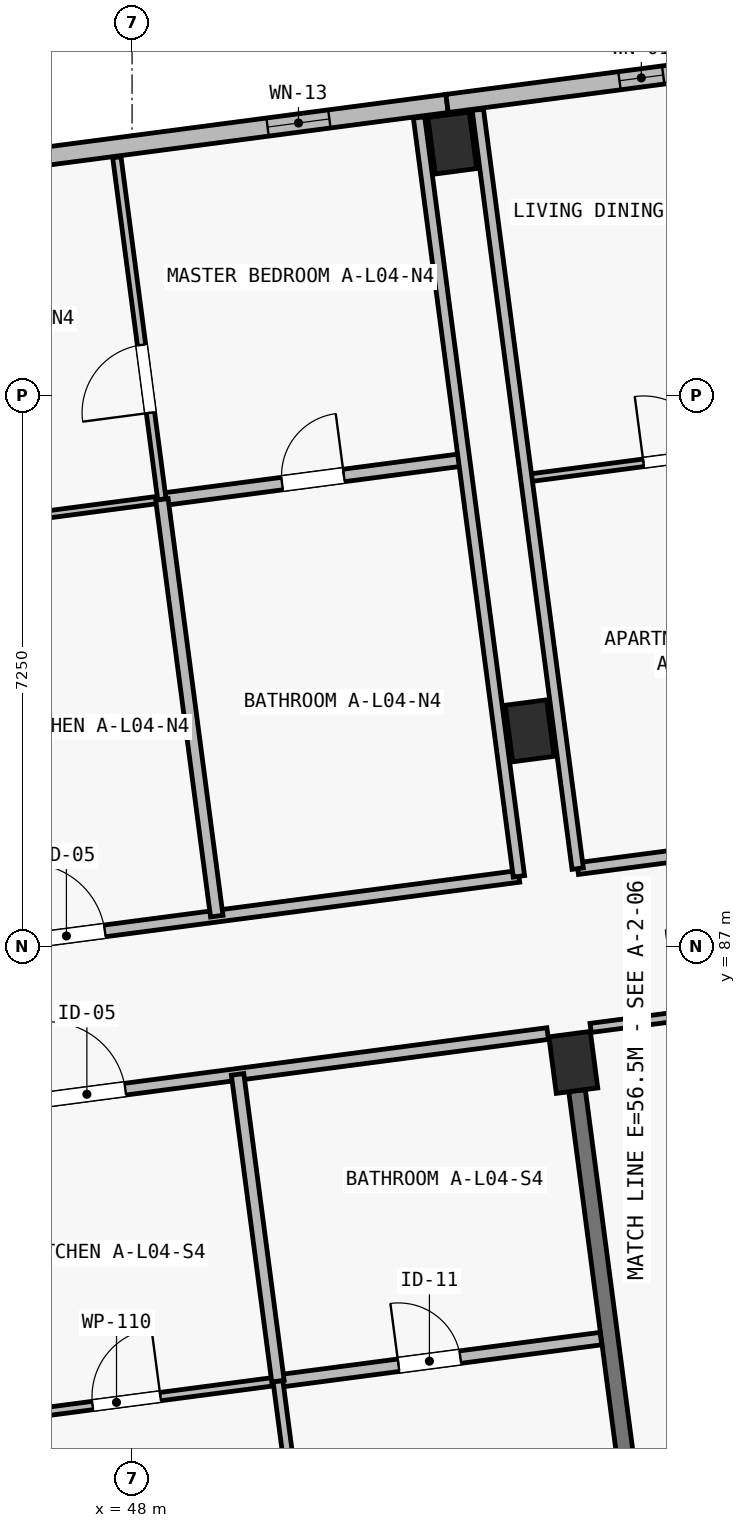
"""IFC4 building model, lengths in metres.
Left out: names, types, materials, properties, quantities, classifications, styles, units other than length and angle.
Written with IfcOpenShell. Run it as: python <this file> out.ifc"""

import sys

from ifc_helpers import new_model, si_unit, direction, frame, frame_2d, origin, origin_2d, place, context, subcontext, project, spatial, rectangle, extrude, element, fill, save


model = new_model("IFC4")
c1 = context("Model", 3, precision=1e-05, world=origin(), true_north=direction((0.0, 1.0)))
c2 = subcontext(c1, "Body", "Model", "MODEL_VIEW")
j1 = project(units=[si_unit("LENGTHUNIT", "METRE"), si_unit("PLANEANGLEUNIT", "RADIAN")], contexts=[c1])
p1 = place(None, origin())
s1 = spatial("IfcSite", under=j1, at=p1, CompositionType="ELEMENT")
p2 = place(p1, origin())
s2 = spatial("IfcBuilding", under=s1, at=p2, CompositionType="ELEMENT")
p3 = place(p2, frame((0.0, 0.0, 14.9)))
s3 = spatial("IfcBuildingStorey", under=s2, at=p3, CompositionType="ELEMENT", Elevation=14.9)
for number, where, z_axis, x_axis in (
    (1, (53.805, 85.476, 0.0), (0.0, 0.0, 1.0), (0.991, 0.131, 0.0)),
    (2, (53.231, 89.839, 0.0), (0.0, 0.0, 1.0), (0.991, 0.131, 0.0)),
    (3, (52.213, 97.572, 0.0), (0.0, 0.0, 1.0), (0.991, 0.131, 0.0)),
):
    element("IfcColumn", number, at=place(p3, frame(where, z_axis=z_axis, x_axis=x_axis)), inside=s3, PredefinedType="COLUMN", context=c2, shape_type="SweptSolid", body=[
        extrude(rectangle(XDim=0.55, YDim=0.75, at=origin_2d()), origin(), (0.0, 0.0, 1.0), 3.25),
    ])
p4 = place(p3, frame((54.775, 78.115, 0.0), z_axis=(0.0, 0.0, 1.0), x_axis=(-0.130519009654, 0.99144580695, 0.0)))
e4 = element("IfcWall", 4, at=p4, inside=s3, PredefinedType="SHEAR", context=c2, shape_type="SweptSolid", body=[
    extrude(rectangle(XDim=7.05, YDim=0.22, at=frame_2d((3.525, 0.0))), origin(), (0.0, 0.0, 1.0), 2.5),
])
p5 = place(p3, frame((43.42, 96.944, 0.0), z_axis=(0.0, 0.0, 1.0), x_axis=(0.991443905089, 0.130533455715, 0.0)))
e5 = element("IfcWall", 5, at=p5, inside=s3, PredefinedType="SOLIDWALL", context=c2, shape_type="SweptSolid", body=[
    extrude(rectangle(XDim=8.8, YDim=0.24, at=frame_2d((4.4, 0.0))), origin(), (0.0, 0.0, 1.0), 3.0),
])
p6 = place(p5, frame((1.001, 0.0, 0.44)))
e6 = element("IfcOpeningElement", 6, at=p6, cuts=e5, PredefinedType="OPENING", context=c2, shape_type="SweptSolid", body=[
    extrude(rectangle(XDim=0.74, YDim=2.26, at=frame_2d((0.37, 1.13))), frame((0.0, 0.135, 0.0), z_axis=(0.0, -1.0, 0.0), x_axis=(1.0, 0.0, 0.0)), (0.0, 0.0, 1.0), 0.27),
])
p7 = place(p5, frame((6.418, 0.0, 0.5)))
e7 = element("IfcOpeningElement", 7, at=p7, cuts=e5, PredefinedType="OPENING", context=c2, shape_type="SweptSolid", body=[
    extrude(rectangle(XDim=0.82, YDim=2.18, at=frame_2d((0.41, 1.09))), frame((0.0, 0.135, 0.0), z_axis=(0.0, -1.0, 0.0), x_axis=(1.0, 0.0, 0.0)), (0.0, 0.0, 1.0), 0.27),
])
p8 = place(p3, frame((52.145, 98.093, 0.0), z_axis=(0.0, 0.0, 1.0), x_axis=(0.991442885224, 0.130541201693, 0.0)))
e8 = element("IfcWall", 8, at=p8, inside=s3, PredefinedType="SOLIDWALL", context=c2, shape_type="SweptSolid", body=[
    extrude(rectangle(XDim=9.325, YDim=0.24, at=frame_2d((4.663, 0.0))), origin(), (0.0, 0.0, 1.0), 3.0),
])
p9 = place(p8, frame((2.288, 0.0, 0.5)))
e9 = element("IfcOpeningElement", 9, at=p9, cuts=e8, PredefinedType="OPENING", context=c2, shape_type="SweptSolid", body=[
    extrude(rectangle(XDim=0.58, YDim=2.16, at=frame_2d((0.29, 1.08))), frame((0.0, 0.135, 0.0), z_axis=(0.0, -1.0, 0.0), x_axis=(1.0, 0.0, 0.0)), (0.0, 0.0, 1.0), 0.27),
])
p10 = place(p8, frame((5.873, 0.0, 0.44)))
e10 = element("IfcOpeningElement", 10, at=p10, cuts=e8, PredefinedType="OPENING", context=c2, shape_type="SweptSolid", body=[
    extrude(rectangle(XDim=0.66, YDim=2.32, at=frame_2d((0.33, 1.16))), frame((0.0, 0.135, 0.0), z_axis=(0.0, -1.0, 0.0), x_axis=(1.0, 0.0, 0.0)), (0.0, 0.0, 1.0), 0.27),
])
p11 = place(p3, frame((45.309, 84.781, 0.0), z_axis=(0.0, 0.0, 1.0), x_axis=(0.991444700604, 0.130527413383, 0.0)))
e11 = element("IfcWall", 11, at=p11, inside=s3, PredefinedType="PARTITIONING", context=c2, shape_type="SweptSolid", body=[
    extrude(rectangle(XDim=8.23, YDim=0.155, at=frame_2d((4.115, 0.0))), origin(), (0.0, 0.0, 1.0), 2.97),
])
p12 = place(p11, frame((1.605, 0.0, 0.0)))
e12 = element("IfcOpeningElement", 12, at=p12, cuts=e11, PredefinedType="OPENING", context=c2, shape_type="SweptSolid", body=[
    extrude(rectangle(XDim=1.02, YDim=2.2, at=frame_2d((0.51, 1.1))), frame((0.0, 0.093, 0.0), z_axis=(0.0, -1.0, 0.0), x_axis=(1.0, 0.0, 0.0)), (0.0, 0.0, 1.0), 0.185),
])
p13 = place(p3, frame((45.671, 80.724, 0.0), z_axis=(0.0, 0.0, 1.0), x_axis=(0.991444014242, 0.130532626667, 0.0)))
e13 = element("IfcWall", 13, at=p13, inside=s3, PredefinedType="PARTITIONING", context=c2, shape_type="SweptSolid", body=[
    extrude(rectangle(XDim=4.285, YDim=0.11, at=frame_2d((2.143, 0.0))), origin(), (0.0, 0.0, 1.0), 2.97),
])
p14 = place(p13, frame((1.825, 0.0, 0.0)))
e14 = element("IfcOpeningElement", 14, at=p14, cuts=e13, PredefinedType="OPENING", context=c2, shape_type="SweptSolid", body=[
    extrude(rectangle(XDim=0.9, YDim=2.1, at=frame_2d((0.45, 1.05))), frame((0.0, 0.07, 0.0), z_axis=(0.0, -1.0, 0.0), x_axis=(1.0, 0.0, 0.0)), (0.0, 0.0, 1.0), 0.14),
])
p15 = place(p3, frame((49.919, 81.283, 0.0), z_axis=(0.0, 0.0, 1.0), x_axis=(0.991452356241, 0.130469250419, 0.0)))
e15 = element("IfcWall", 15, at=p15, inside=s3, PredefinedType="PLUMBINGWALL", context=c2, shape_type="SweptSolid", body=[
    extrude(rectangle(XDim=4.285, YDim=0.165, at=frame_2d((2.143, 0.0))), origin(), (0.0, 0.0, 1.0), 2.97),
])
p16 = place(p15, frame((1.6, 0.0, 0.0)))
e16 = element("IfcOpeningElement", 16, at=p16, cuts=e15, PredefinedType="OPENING", context=c2, shape_type="SweptSolid", body=[
    extrude(rectangle(XDim=0.82, YDim=2.08, at=frame_2d((0.41, 1.04))), frame((0.0, 0.097, 0.0), z_axis=(0.0, -1.0, 0.0), x_axis=(1.0, 0.0, 0.0)), (0.0, 0.0, 1.0), 0.195),
])
p17 = place(p3, frame((50.512, 76.782, 0.0), z_axis=(0.0, 0.0, 1.0), x_axis=(-0.130564403497, 0.991439830015, 0.0)))
e17 = element("IfcWall", 17, at=p17, inside=s3, PredefinedType="PARTITIONING", context=c2, shape_type="SweptSolid", body=[
    extrude(rectangle(XDim=4.54, YDim=0.13, at=frame_2d((2.27, 0.0))), origin(), (0.0, 0.0, 1.0), 2.97),
])
p18 = place(p17, frame((1.35, 0.0, 0.0)))
e18 = element("IfcOpeningElement", 18, at=p18, cuts=e17, PredefinedType="OPENING", context=c2, shape_type="SweptSolid", body=[
    extrude(rectangle(XDim=0.88, YDim=2.1, at=frame_2d((0.44, 1.05))), frame((0.0, 0.08, 0.0), z_axis=(0.0, -1.0, 0.0), x_axis=(1.0, 0.0, 0.0)), (0.0, 0.0, 1.0), 0.16),
])
p19 = place(p3, frame((49.919, 81.283, 0.0), z_axis=(0.0, 0.0, 1.0), x_axis=(-0.13052899417, 0.991444492486, 0.0)))
e19 = element("IfcWall", 19, at=p19, inside=s3, PredefinedType="PLUMBINGWALL", context=c2, shape_type="SweptSolid", body=[
    extrude(rectangle(XDim=4.07, YDim=0.165, at=frame_2d((2.035, 0.0))), origin(), (0.0, 0.0, 1.0), 2.97),
])
p20 = place(p3, frame((54.033, 85.93, 0.0), z_axis=(0.0, 0.0, 1.0), x_axis=(0.991442898952, 0.130541097431, 0.0)))
e20 = element("IfcWall", 20, at=p20, inside=s3, PredefinedType="PARTITIONING", context=c2, shape_type="SweptSolid", body=[
    extrude(rectangle(XDim=5.835, YDim=0.12, at=frame_2d((2.917, 0.0))), origin(), (0.0, 0.0, 1.0), 2.97),
])
p21 = place(p20, frame((1.15, 0.0, 0.0)))
e21 = element("IfcOpeningElement", 21, at=p21, cuts=e20, PredefinedType="OPENING", context=c2, shape_type="SweptSolid", body=[
    extrude(rectangle(XDim=1.15, YDim=2.15, at=frame_2d((0.575, 1.075))), frame((0.0, 0.075, 0.0), z_axis=(0.0, -1.0, 0.0), x_axis=(1.0, 0.0, 0.0)), (0.0, 0.0, 1.0), 0.15),
])
p22 = place(p3, frame((45.138, 86.877, 0.0), z_axis=(0.0, 0.0, 1.0), x_axis=(0.991444034844, 0.130532470184, 0.0)))
e22 = element("IfcWall", 22, at=p22, inside=s3, PredefinedType="PARTITIONING", context=c2, shape_type="SweptSolid", body=[
    extrude(rectangle(XDim=8.02, YDim=0.155, at=frame_2d((4.01, 0.0))), origin(), (0.0, 0.0, 1.0), 2.97),
])
p23 = place(p22, frame((1.505, 0.0, 0.0)))
e23 = element("IfcOpeningElement", 23, at=p23, cuts=e22, PredefinedType="OPENING", context=c2, shape_type="SweptSolid", body=[
    extrude(rectangle(XDim=1.02, YDim=2.2, at=frame_2d((0.51, 1.1))), frame((0.0, 0.093, 0.0), z_axis=(0.0, -1.0, 0.0), x_axis=(1.0, 0.0, 0.0)), (0.0, 0.0, 1.0), 0.185),
])
p24 = place(p3, frame((44.417, 92.36, 0.0), z_axis=(0.0, 0.0, 1.0), x_axis=(0.991443516139, 0.130536409887, 0.0)))
e24 = element("IfcWall", 24, at=p24, inside=s3, PredefinedType="PARTITIONING", context=c2, shape_type="SweptSolid", body=[
    extrude(rectangle(XDim=4.01, YDim=0.095, at=frame_2d((2.005, 0.0))), origin(), (0.0, 0.0, 1.0), 2.97),
])
p25 = place(p24, frame((1.555, 0.0, 0.0)))
e25 = element("IfcOpeningElement", 25, at=p25, cuts=e24, PredefinedType="OPENING", context=c2, shape_type="SweptSolid", body=[
    extrude(rectangle(XDim=0.9, YDim=2.1, at=frame_2d((0.45, 1.05))), frame((0.0, 0.062, 0.0), z_axis=(0.0, -1.0, 0.0), x_axis=(1.0, 0.0, 0.0)), (0.0, 0.0, 1.0), 0.125),
])
p26 = place(p3, frame((48.392, 92.883, 0.0), z_axis=(0.0, 0.0, 1.0), x_axis=(0.991444553502, 0.130528530716, 0.0)))
e26 = element("IfcWall", 26, at=p26, inside=s3, PredefinedType="PLUMBINGWALL", context=c2, shape_type="SweptSolid", body=[
    extrude(rectangle(XDim=4.01, YDim=0.165, at=frame_2d((2.005, 0.0))), origin(), (0.0, 0.0, 1.0), 2.97),
])
p27 = place(p26, frame((1.595, 0.0, 0.0)))
e27 = element("IfcOpeningElement", 27, at=p27, cuts=e26, PredefinedType="OPENING", context=c2, shape_type="SweptSolid", body=[
    extrude(rectangle(XDim=0.82, YDim=2.08, at=frame_2d((0.41, 1.04))), frame((0.0, 0.097, 0.0), z_axis=(0.0, -1.0, 0.0), x_axis=(1.0, 0.0, 0.0)), (0.0, 0.0, 1.0), 0.195),
])
p28 = place(p3, frame((48.392, 92.883, 0.0), z_axis=(0.0, 0.0, 1.0), x_axis=(-0.130518503748, 0.99144587355, 0.0)))
e28 = element("IfcWall", 28, at=p28, inside=s3, PredefinedType="PARTITIONING", context=c2, shape_type="SweptSolid", body=[
    extrude(rectangle(XDim=4.54, YDim=0.11, at=frame_2d((2.27, 0.0))), origin(), (0.0, 0.0, 1.0), 2.97),
])
p29 = place(p28, frame((1.15, 0.0, 0.0)))
e29 = element("IfcOpeningElement", 29, at=p29, cuts=e28, PredefinedType="OPENING", context=c2, shape_type="SweptSolid", body=[
    extrude(rectangle(XDim=0.9, YDim=2.1, at=frame_2d((0.45, 1.05))), frame((0.0, 0.07, 0.0), z_axis=(0.0, -1.0, 0.0), x_axis=(1.0, 0.0, 0.0)), (0.0, 0.0, 1.0), 0.14),
])
p30 = place(p3, frame((49.114, 87.401, 0.0), z_axis=(0.0, 0.0, 1.0), x_axis=(-0.130547016415, 0.991442119594, 0.0)))
e30 = element("IfcWall", 30, at=p30, inside=s3, PredefinedType="PLUMBINGWALL", context=c2, shape_type="SweptSolid", body=[
    extrude(rectangle(XDim=5.53, YDim=0.165, at=frame_2d((2.765, 0.0))), origin(), (0.0, 0.0, 1.0), 2.97),
])
p31 = place(p3, frame((53.09, 87.924, 0.0), z_axis=(0.0, 0.0, 1.0), x_axis=(-0.130534161944, 0.991443812107, 0.0)))
e31 = element("IfcWall", 31, at=p31, inside=s3, PredefinedType="PARTITIONING", context=c2, shape_type="SweptSolid", body=[
    extrude(rectangle(XDim=10.07, YDim=0.15, at=frame_2d((5.035, 0.0))), origin(), (0.0, 0.0, 1.0), 2.97),
])
p32 = place(p3, frame((53.863, 88.026, 0.0), z_axis=(0.0, 0.0, 1.0), x_axis=(0.991447973994, 0.130502547346, 0.0)))
e32 = element("IfcWall", 32, at=p32, inside=s3, PredefinedType="PARTITIONING", context=c2, shape_type="SweptSolid", body=[
    extrude(rectangle(XDim=8.02, YDim=0.155, at=frame_2d((4.01, 0.0))), origin(), (0.0, 0.0, 1.0), 2.97),
])
p33 = place(p32, frame((1.505, 0.0, 0.0)))
e33 = element("IfcOpeningElement", 33, at=p33, cuts=e32, PredefinedType="OPENING", context=c2, shape_type="SweptSolid", body=[
    extrude(rectangle(XDim=0.98, YDim=2.15, at=frame_2d((0.49, 1.075))), frame((0.0, 0.093, 0.0), z_axis=(0.0, -1.0, 0.0), x_axis=(1.0, 0.0, 0.0)), (0.0, 0.0, 1.0), 0.185),
])
p34 = place(p3, frame((53.187, 93.161, 0.0), z_axis=(0.0, 0.0, 1.0), x_axis=(0.991444553502, 0.130528530716, 0.0)))
e34 = element("IfcWall", 34, at=p34, inside=s3, PredefinedType="PARTITIONING", context=c2, shape_type="SweptSolid", body=[
    extrude(rectangle(XDim=4.01, YDim=0.1, at=frame_2d((2.005, 0.0))), origin(), (0.0, 0.0, 1.0), 2.97),
])
p35 = place(p34, frame((1.555, 0.0, 0.0)))
e35 = element("IfcOpeningElement", 35, at=p35, cuts=e34, PredefinedType="OPENING", context=c2, shape_type="SweptSolid", body=[
    extrude(rectangle(XDim=0.88, YDim=2.1, at=frame_2d((0.44, 1.05))), frame((0.0, 0.065, 0.0), z_axis=(0.0, -1.0, 0.0), x_axis=(1.0, 0.0, 0.0)), (0.0, 0.0, 1.0), 0.13),
])
p36 = place(p3, frame((53.863, 88.026, 0.0), z_axis=(0.0, 0.0, 1.0), x_axis=(-0.130534161944, 0.991443812107, 0.0)))
e36 = element("IfcWall", 36, at=p36, inside=s3, PredefinedType="PARTITIONING", context=c2, shape_type="SweptSolid", body=[
    extrude(rectangle(XDim=10.07, YDim=0.15, at=frame_2d((5.035, 0.0))), origin(), (0.0, 0.0, 1.0), 2.97),
])
p37 = place(p7, origin())
e37 = element("IfcWindow", 37, at=p37, inside=s3, PartitioningType="SINGLE_PANEL", PredefinedType="WINDOW", context=c2, shape_type="SweptSolid", body=[
    extrude(rectangle(XDim=0.82, YDim=2.18, at=frame_2d((0.41, 1.09))), frame((0.0, 0.03, 0.0), z_axis=(0.0, -1.0, 0.0), x_axis=(1.0, 0.0, 0.0)), (0.0, 0.0, 1.0), 0.06),
])
fill(e7, e37)
p38 = place(p9, origin())
e38 = element("IfcWindow", 38, at=p38, inside=s3, PartitioningType="SINGLE_PANEL", PredefinedType="WINDOW", context=c2, shape_type="SweptSolid", body=[
    extrude(rectangle(XDim=0.58, YDim=2.16, at=frame_2d((0.29, 1.08))), frame((0.0, 0.03, 0.0), z_axis=(0.0, -1.0, 0.0), x_axis=(1.0, 0.0, 0.0)), (0.0, 0.0, 1.0), 0.06),
])
fill(e9, e38)
p39 = place(p12, origin())
e39 = element("IfcDoor", 39, at=p39, inside=s3, OperationType="SINGLE_SWING_LEFT", PredefinedType="DOOR", context=c2, shape_type="SweptSolid", body=[
    extrude(rectangle(XDim=1.02, YDim=2.2, at=frame_2d((0.51, 1.1))), frame((0.0, 0.025, 0.0), z_axis=(0.0, -1.0, 0.0), x_axis=(1.0, 0.0, 0.0)), (0.0, 0.0, 1.0), 0.05),
])
fill(e12, e39)
p40 = place(p14, origin())
e40 = element("IfcDoor", 40, at=p40, inside=s3, OperationType="SINGLE_SWING_RIGHT", PredefinedType="DOOR", context=c2, shape_type="SweptSolid", body=[
    extrude(rectangle(XDim=0.9, YDim=2.1, at=frame_2d((0.45, 1.05))), frame((0.0, 0.025, 0.0), z_axis=(0.0, -1.0, 0.0), x_axis=(1.0, 0.0, 0.0)), (0.0, 0.0, 1.0), 0.05),
])
fill(e14, e40)
p41 = place(p16, origin())
e41 = element("IfcDoor", 41, at=p41, inside=s3, OperationType="SINGLE_SWING_LEFT", PredefinedType="DOOR", context=c2, shape_type="SweptSolid", body=[
    extrude(rectangle(XDim=0.82, YDim=2.08, at=frame_2d((0.41, 1.04))), frame((0.0, 0.025, 0.0), z_axis=(0.0, -1.0, 0.0), x_axis=(1.0, 0.0, 0.0)), (0.0, 0.0, 1.0), 0.05),
])
fill(e16, e41)
p42 = place(p23, origin())
e42 = element("IfcDoor", 42, at=p42, inside=s3, OperationType="SINGLE_SWING_LEFT", PredefinedType="DOOR", context=c2, shape_type="SweptSolid", body=[
    extrude(rectangle(XDim=1.02, YDim=2.2, at=frame_2d((0.51, 1.1))), frame((0.0, 0.025, 0.0), z_axis=(0.0, -1.0, 0.0), x_axis=(1.0, 0.0, 0.0)), (0.0, 0.0, 1.0), 0.05),
])
fill(e23, e42)
p43 = place(p27, origin())
e43 = element("IfcDoor", 43, at=p43, inside=s3, OperationType="SINGLE_SWING_RIGHT", PredefinedType="DOOR", context=c2, shape_type="SweptSolid", body=[
    extrude(rectangle(XDim=0.82, YDim=2.08, at=frame_2d((0.41, 1.04))), frame((0.0, 0.025, 0.0), z_axis=(0.0, -1.0, 0.0), x_axis=(1.0, 0.0, 0.0)), (0.0, 0.0, 1.0), 0.05),
])
fill(e27, e43)
p44 = place(p29, origin())
e44 = element("IfcDoor", 44, at=p44, inside=s3, OperationType="SINGLE_SWING_LEFT", PredefinedType="DOOR", context=c2, shape_type="SweptSolid", body=[
    extrude(rectangle(XDim=0.9, YDim=2.1, at=frame_2d((0.45, 1.05))), frame((0.0, 0.025, 0.0), z_axis=(0.0, -1.0, 0.0), x_axis=(1.0, 0.0, 0.0)), (0.0, 0.0, 1.0), 0.05),
])
fill(e29, e44)
p45 = place(p35, origin())
e45 = element("IfcDoor", 45, at=p45, inside=s3, OperationType="SINGLE_SWING_LEFT", PredefinedType="DOOR", context=c2, shape_type="SweptSolid", body=[
    extrude(rectangle(XDim=0.88, YDim=2.1, at=frame_2d((0.44, 1.05))), frame((0.0, 0.025, 0.0), z_axis=(0.0, -1.0, 0.0), x_axis=(1.0, 0.0, 0.0)), (0.0, 0.0, 1.0), 0.05),
])
fill(e35, e45)
save(model, sys.argv[1])
